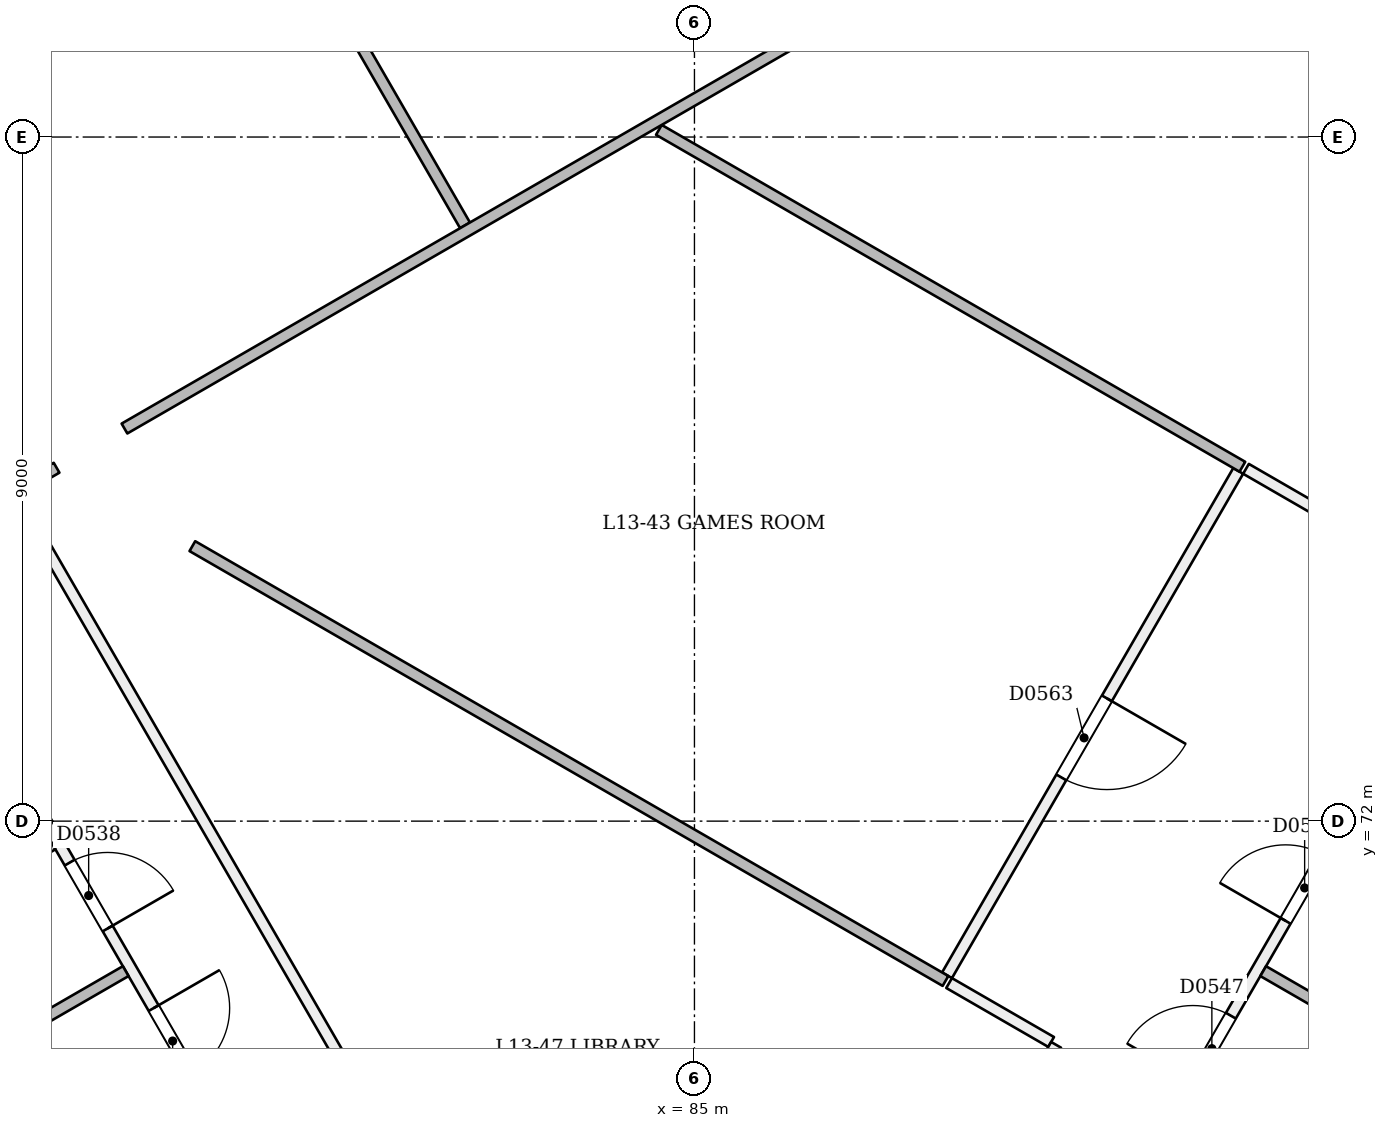
"""IFC4 building model, lengths in metres.
Left out: names, types, materials, properties, quantities, classifications, styles, units other than length and angle.
Written with IfcOpenShell. Run it as: python <this file> out.ifc"""

import sys

from ifc_helpers import new_model, si_unit, direction, frame, frame_2d, origin, place, context, subcontext, project, spatial, rectangle, extrude, element, fill, save


model = new_model("IFC4")
c1 = context("Model", 3, precision=1e-05, world=origin(), true_north=direction((0.0, 1.0)))
c2 = subcontext(c1, "Body", "Model", "MODEL_VIEW")
j1 = project(units=[si_unit("LENGTHUNIT", "METRE"), si_unit("PLANEANGLEUNIT", "RADIAN")], contexts=[c1])
p1 = place(None, origin())
s1 = spatial("IfcSite", under=j1, at=p1, CompositionType="ELEMENT")
p2 = place(p1, origin())
s2 = spatial("IfcBuilding", under=s1, at=p2, CompositionType="ELEMENT")
p3 = place(p2, frame((0.0, 0.0, 55.8)))
s3 = spatial("IfcBuildingStorey", under=s2, at=p3, CompositionType="ELEMENT", Elevation=55.8)
p4 = place(p3, frame((64.083, 93.447, 0.0), z_axis=(0.0, 0.0, 1.0), x_axis=(0.5000018851, -0.866024315419, 0.0)))
e1 = element("IfcWall", 1, at=p4, inside=s3, PredefinedType="PARTITIONING", context=c2, shape_type="SweptSolid", body=[
    extrude(rectangle(XDim=36.0, YDim=0.15, at=frame_2d((18.0, 0.0))), origin(), (0.0, 0.0, 1.0), 2.7),
])
p5 = place(p4, frame((0.605, 0.0, 0.0)))
e2 = element("IfcOpeningElement", 2, at=p5, cuts=e1, PredefinedType="OPENING", context=c2, shape_type="SweptSolid", body=[
    extrude(rectangle(XDim=1.0, YDim=2.1, at=frame_2d((0.5, 1.05))), frame((0.0, 0.085, 0.0), z_axis=(0.0, -1.0, 0.0), x_axis=(1.0, 0.0, 0.0)), (0.0, 0.0, 1.0), 0.171),
])
p6 = place(p4, frame((7.28, 0.0, 0.0)))
e3 = element("IfcOpeningElement", 3, at=p6, cuts=e1, PredefinedType="OPENING", context=c2, shape_type="SweptSolid", body=[
    extrude(rectangle(XDim=1.0, YDim=2.1, at=frame_2d((0.5, 1.05))), frame((0.0, 0.085, 0.0), z_axis=(0.0, -1.0, 0.0), x_axis=(1.0, 0.0, 0.0)), (0.0, 0.0, 1.0), 0.171),
])
p7 = place(p4, frame((9.72, 0.0, 0.0)))
e4 = element("IfcOpeningElement", 4, at=p7, cuts=e1, PredefinedType="OPENING", context=c2, shape_type="SweptSolid", body=[
    extrude(rectangle(XDim=1.0, YDim=2.1, at=frame_2d((0.5, 1.05))), frame((0.0, 0.085, 0.0), z_axis=(0.0, -1.0, 0.0), x_axis=(1.0, 0.0, 0.0)), (0.0, 0.0, 1.0), 0.171),
])
p8 = place(p4, frame((16.395, 0.0, 0.0)))
e5 = element("IfcOpeningElement", 5, at=p8, cuts=e1, PredefinedType="OPENING", context=c2, shape_type="SweptSolid", body=[
    extrude(rectangle(XDim=1.0, YDim=2.1, at=frame_2d((0.5, 1.05))), frame((0.0, 0.085, 0.0), z_axis=(0.0, -1.0, 0.0), x_axis=(1.0, 0.0, 0.0)), (0.0, 0.0, 1.0), 0.171),
])
p9 = place(p4, frame((18.72, 0.0, 0.0)))
e6 = element("IfcOpeningElement", 6, at=p9, cuts=e1, PredefinedType="OPENING", context=c2, shape_type="SweptSolid", body=[
    extrude(rectangle(XDim=1.0, YDim=2.1, at=frame_2d((0.5, 1.05))), frame((0.0, 0.085, 0.0), z_axis=(0.0, -1.0, 0.0), x_axis=(1.0, 0.0, 0.0)), (0.0, 0.0, 1.0), 0.171),
])
p10 = place(p4, frame((25.395, 0.0, 0.0)))
e7 = element("IfcOpeningElement", 7, at=p10, cuts=e1, PredefinedType="OPENING", context=c2, shape_type="SweptSolid", body=[
    extrude(rectangle(XDim=1.0, YDim=2.1, at=frame_2d((0.5, 1.05))), frame((0.0, 0.085, 0.0), z_axis=(0.0, -1.0, 0.0), x_axis=(1.0, 0.0, 0.0)), (0.0, 0.0, 1.0), 0.171),
])
p11 = place(p4, frame((27.605, 0.0, 0.0)))
e8 = element("IfcOpeningElement", 8, at=p11, cuts=e1, PredefinedType="OPENING", context=c2, shape_type="SweptSolid", body=[
    extrude(rectangle(XDim=1.0, YDim=2.1, at=frame_2d((0.5, 1.05))), frame((0.0, 0.085, 0.0), z_axis=(0.0, -1.0, 0.0), x_axis=(1.0, 0.0, 0.0)), (0.0, 0.0, 1.0), 0.171),
])
p12 = place(p4, frame((34.28, 0.0, 0.0)))
e9 = element("IfcOpeningElement", 9, at=p12, cuts=e1, PredefinedType="OPENING", context=c2, shape_type="SweptSolid", body=[
    extrude(rectangle(XDim=1.0, YDim=2.1, at=frame_2d((0.5, 1.05))), frame((0.0, 0.085, 0.0), z_axis=(0.0, -1.0, 0.0), x_axis=(1.0, 0.0, 0.0)), (0.0, 0.0, 1.0), 0.171),
])
p13 = place(p3, frame((85.99, 58.932, 0.0), z_axis=(0.0, 0.0, 1.0), x_axis=(0.500001547762, 0.866024510182, 0.0)))
e10 = element("IfcWall", 10, at=p13, inside=s3, PredefinedType="PARTITIONING", context=c2, shape_type="SweptSolid", body=[
    extrude(rectangle(XDim=42.454, YDim=0.15, at=frame_2d((21.227, 0.0))), origin(), (0.0, 0.0, 1.0), 2.7),
])
p14 = place(p13, frame((3.577, 0.0, 0.0)))
e11 = element("IfcOpeningElement", 11, at=p14, cuts=e10, PredefinedType="OPENING", context=c2, shape_type="SweptSolid", body=[
    extrude(rectangle(XDim=1.2, YDim=2.1, at=frame_2d((0.6, 1.05))), frame((0.0, 0.085, 0.0), z_axis=(0.0, -1.0, 0.0), x_axis=(1.0, 0.0, 0.0)), (0.0, 0.0, 1.0), 0.171),
])
p15 = place(p13, frame((11.134, 0.0, 0.0)))
e12 = element("IfcOpeningElement", 12, at=p15, cuts=e10, PredefinedType="OPENING", context=c2, shape_type="SweptSolid", body=[
    extrude(rectangle(XDim=1.0, YDim=2.1, at=frame_2d((0.5, 1.05))), frame((0.0, 0.085, 0.0), z_axis=(0.0, -1.0, 0.0), x_axis=(1.0, 0.0, 0.0)), (0.0, 0.0, 1.0), 0.171),
])
p16 = place(p13, frame((13.575, 0.0, 0.0)))
e13 = element("IfcOpeningElement", 13, at=p16, cuts=e10, PredefinedType="OPENING", context=c2, shape_type="SweptSolid", body=[
    extrude(rectangle(XDim=1.0, YDim=2.1, at=frame_2d((0.5, 1.05))), frame((0.0, 0.085, 0.0), z_axis=(0.0, -1.0, 0.0), x_axis=(1.0, 0.0, 0.0)), (0.0, 0.0, 1.0), 0.171),
])
p17 = place(p13, frame((20.134, 0.0, 0.0)))
e14 = element("IfcOpeningElement", 14, at=p17, cuts=e10, PredefinedType="OPENING", context=c2, shape_type="SweptSolid", body=[
    extrude(rectangle(XDim=1.0, YDim=2.1, at=frame_2d((0.5, 1.05))), frame((0.0, 0.085, 0.0), z_axis=(0.0, -1.0, 0.0), x_axis=(1.0, 0.0, 0.0)), (0.0, 0.0, 1.0), 0.171),
])
p18 = place(p13, frame((22.575, 0.0, 0.0)))
e15 = element("IfcOpeningElement", 15, at=p18, cuts=e10, PredefinedType="OPENING", context=c2, shape_type="SweptSolid", body=[
    extrude(rectangle(XDim=1.0, YDim=2.1, at=frame_2d((0.5, 1.05))), frame((0.0, 0.085, 0.0), z_axis=(0.0, -1.0, 0.0), x_axis=(1.0, 0.0, 0.0)), (0.0, 0.0, 1.0), 0.171),
])
p19 = place(p13, frame((29.134, 0.0, 0.0)))
e16 = element("IfcOpeningElement", 16, at=p19, cuts=e10, PredefinedType="OPENING", context=c2, shape_type="SweptSolid", body=[
    extrude(rectangle(XDim=1.0, YDim=2.1, at=frame_2d((0.5, 1.05))), frame((0.0, 0.085, 0.0), z_axis=(0.0, -1.0, 0.0), x_axis=(1.0, 0.0, 0.0)), (0.0, 0.0, 1.0), 0.171),
])
p20 = place(p13, frame((31.575, 0.0, 0.0)))
e17 = element("IfcOpeningElement", 17, at=p20, cuts=e10, PredefinedType="OPENING", context=c2, shape_type="SweptSolid", body=[
    extrude(rectangle(XDim=1.0, YDim=2.1, at=frame_2d((0.5, 1.05))), frame((0.0, 0.085, 0.0), z_axis=(0.0, -1.0, 0.0), x_axis=(1.0, 0.0, 0.0)), (0.0, 0.0, 1.0), 0.171),
])
p21 = place(p13, frame((38.134, 0.0, 0.0)))
e18 = element("IfcOpeningElement", 18, at=p21, cuts=e10, PredefinedType="OPENING", context=c2, shape_type="SweptSolid", body=[
    extrude(rectangle(XDim=1.0, YDim=2.1, at=frame_2d((0.5, 1.05))), frame((0.0, 0.085, 0.0), z_axis=(0.0, -1.0, 0.0), x_axis=(1.0, 0.0, 0.0)), (0.0, 0.0, 1.0), 0.171),
])
p22 = place(p13, frame((41.161, 0.0, 0.0)))
e19 = element("IfcOpeningElement", 19, at=p22, cuts=e10, PredefinedType="OPENING", context=c2, shape_type="SweptSolid", body=[
    extrude(rectangle(XDim=1.0, YDim=2.1, at=frame_2d((0.5, 1.05))), frame((0.0, 0.085, 0.0), z_axis=(0.0, -1.0, 0.0), x_axis=(1.0, 0.0, 0.0)), (0.0, 0.0, 1.0), 0.171),
])
p23 = place(p3, frame((92.154, 76.607, 0.0), z_axis=(0.0, 0.0, 1.0), x_axis=(-0.499984506476, -0.86603434879, 0.0)))
e20 = element("IfcWall", 20, at=p23, inside=s3, PredefinedType="PARTITIONING", context=c2, shape_type="SweptSolid", body=[
    extrude(rectangle(XDim=7.661, YDim=0.15, at=frame_2d((3.831, 0.0))), origin(), (0.0, 0.0, 1.0), 3.1),
])
p24 = place(p23, frame((3.455, 0.0, 0.0)))
e21 = element("IfcOpeningElement", 21, at=p24, cuts=e20, PredefinedType="OPENING", context=c2, shape_type="SweptSolid", body=[
    extrude(rectangle(XDim=1.2, YDim=2.1, at=frame_2d((0.6, 1.05))), frame((0.0, 0.085, 0.0), z_axis=(0.0, -1.0, 0.0), x_axis=(1.0, 0.0, 0.0)), (0.0, 0.0, 1.0), 0.171),
])
for number, where, z_axis, x_axis in (
    (22, (93.598, 75.86, 0.0), (0.0, 0.0, 1.0), (-0.866, 0.5, 0.0)),
    (23, (88.35, 69.87, 0.0), (0.0, 0.0, 1.0), (0.866, -0.5, 0.0)),
):
    element("IfcWall", number, at=place(p3, frame(where, z_axis=z_axis, x_axis=x_axis)), inside=s3, PredefinedType="PARTITIONING", context=c2, shape_type="SweptSolid", body=[
        extrude(rectangle(XDim=1.55, YDim=0.15, at=frame_2d((0.775, 0.0))), origin(), (0.0, 0.0, 1.0), 3.1),
    ])
p25 = place(p3, frame((89.758, 69.057, 0.0), z_axis=(0.0, 0.0, 1.0), x_axis=(-0.499985904184, -0.866033541855, 0.0)))
e24 = element("IfcWall", 24, at=p25, inside=s3, PredefinedType="PARTITIONING", context=c2, shape_type="SweptSolid", body=[
    extrude(rectangle(XDim=9.385, YDim=0.15, at=frame_2d((4.693, 0.0))), origin(), (0.0, 0.0, 1.0), 3.1),
])
p26 = place(p3, frame((85.0, 60.817, 0.0), z_axis=(0.0, 0.0, 1.0), x_axis=(-0.49999631887, 0.866027529076, 0.0)))
e25 = element("IfcWall", 25, at=p26, inside=s3, PredefinedType="PARTITIONING", context=c2, shape_type="SweptSolid", body=[
    extrude(rectangle(XDim=34.391, YDim=0.15, at=frame_2d((17.195, 0.0))), origin(), (0.0, 0.0, 1.0), 3.1),
])
p27 = place(p26, frame((24.599, 0.0, 0.0)))
e26 = element("IfcOpeningElement", 26, at=p27, cuts=e25, PredefinedType="OPENING", context=c2, shape_type="SweptSolid", body=[
    extrude(rectangle(XDim=1.2, YDim=2.1, at=frame_2d((0.6, 1.05))), frame((0.0, 0.085, 0.0), z_axis=(0.0, -1.0, 0.0), x_axis=(1.0, 0.0, 0.0)), (0.0, 0.0, 1.0), 0.171),
])
p28 = place(p26, frame((7.281, 0.0, 0.0)))
e27 = element("IfcOpeningElement", 27, at=p28, cuts=e25, PredefinedType="OPENING", context=c2, shape_type="SweptSolid", body=[
    extrude(rectangle(XDim=1.2, YDim=2.1, at=frame_2d((0.6, 1.05))), frame((0.0, 0.085, 0.0), z_axis=(0.0, -1.0, 0.0), x_axis=(1.0, 0.0, 0.0)), (0.0, 0.0, 1.0), 0.171),
])
p29 = place(p3, frame((76.568, 71.672, 0.0), z_axis=(0.0, 0.0, 1.0), x_axis=(-0.86601045545, -0.500025890382, 0.0)))
e28 = element("IfcWall", 28, at=p29, inside=s3, PredefinedType="PARTITIONING", context=c2, shape_type="SweptSolid", body=[
    extrude(rectangle(XDim=2.925, YDim=0.1, at=frame_2d((1.462, 0.0))), origin(), (0.0, 0.0, 1.0), 3.1),
])
p30 = place(p29, frame((0.975, 0.0, 0.0)))
e29 = element("IfcOpeningElement", 29, at=p30, cuts=e28, PredefinedType="OPENING", context=c2, shape_type="SweptSolid", body=[
    extrude(rectangle(XDim=0.9, YDim=2.1, at=frame_2d((0.45, 1.05))), frame((0.0, 0.061, 0.0), z_axis=(0.0, -1.0, 0.0), x_axis=(1.0, 0.0, 0.0)), (0.0, 0.0, 1.0), 0.121),
])
for number, where, z_axis, x_axis in (
    (30, (72.022, 66.854, 0.0), (0.0, 0.0, 1.0), (0.866, 0.5, 0.0)),
    (31, (97.978, 66.854, 0.0), (0.0, 0.0, 1.0), (-0.866, 0.5, 0.0)),
):
    element("IfcWall", number, at=place(p3, frame(where, z_axis=z_axis, x_axis=x_axis)), inside=s3, PredefinedType="PARTITIONING", context=c2, shape_type="SweptSolid", body=[
        extrude(rectangle(XDim=6.345, YDim=0.15, at=frame_2d((3.173, 0.0))), origin(), (0.0, 0.0, 1.0), 2.6),
    ])
p31 = place(p3, frame((92.208, 76.662, 0.0), z_axis=(0.0, 0.0, 1.0), x_axis=(-0.8660209256, 0.500007756363, 0.0)))
e32 = element("IfcWall", 32, at=p31, inside=s3, PredefinedType="PARTITIONING", context=c2, shape_type="SweptSolid", body=[
    extrude(rectangle(XDim=8.864, YDim=0.15, at=frame_2d((4.432, 0.0))), origin(), (0.0, 0.0, 1.0), 3.1),
])
p32 = place(p3, frame((78.395, 75.618, 0.0), z_axis=(0.0, 0.0, 1.0), x_axis=(0.866027097721, -0.499997066004, 0.0)))
e33 = element("IfcWall", 33, at=p32, inside=s3, PredefinedType="PARTITIONING", context=c2, shape_type="SweptSolid", body=[
    extrude(rectangle(XDim=11.441, YDim=0.15, at=frame_2d((5.72, 0.0))), origin(), (0.0, 0.0, 1.0), 3.1),
])
p33 = place(p3, frame((76.111, 76.363, 0.0), z_axis=(0.0, 0.0, 1.0), x_axis=(0.866192672213, 0.499710170603, 0.0)))
e34 = element("IfcWall", 34, at=p33, inside=s3, PredefinedType="PARTITIONING", context=c2, shape_type="SweptSolid", body=[
    extrude(rectangle(XDim=0.573, YDim=0.15, at=frame_2d((0.287, 0.0))), origin(), (0.0, 0.0, 1.0), 3.1),
])
p34 = place(p3, frame((81.982, 79.838, 0.0), z_axis=(0.0, 0.0, 1.0), x_axis=(-0.500008318019, 0.866020601321, 0.0)))
e35 = element("IfcWall", 35, at=p34, inside=s3, PredefinedType="PARTITIONING", context=c2, shape_type="SweptSolid", body=[
    extrude(rectangle(XDim=12.297, YDim=0.15, at=frame_2d((6.148, 0.0))), origin(), (0.0, 0.0, 1.0), 3.1),
])
p35 = place(p3, frame((100.529, 90.46, 0.0), z_axis=(0.0, 0.0, 1.0), x_axis=(-0.866026416576, -0.499998245789, 0.0)))
e36 = element("IfcWall", 36, at=p35, inside=s3, PredefinedType="PARTITIONING", context=c2, shape_type="SweptSolid", body=[
    extrude(rectangle(XDim=26.59, YDim=0.15, at=frame_2d((13.295, 0.0))), origin(), (0.0, 0.0, 1.0), 3.1),
])
p36 = place(p10, origin())
e37 = element("IfcDoor", 37, at=p36, inside=s3, OperationType="SINGLE_SWING_RIGHT", PredefinedType="NOTDEFINED", context=c2, shape_type="SweptSolid", body=[
    extrude(rectangle(XDim=1.0, YDim=2.1, at=frame_2d((0.5, 1.05))), frame((0.0, 0.025, 0.0), z_axis=(0.0, -1.0, 0.0), x_axis=(1.0, 0.0, 0.0)), (0.0, 0.0, 1.0), 0.05),
])
fill(e7, e37)
p37 = place(p11, origin())
e38 = element("IfcDoor", 38, at=p37, inside=s3, OperationType="SINGLE_SWING_LEFT", PredefinedType="NOTDEFINED", context=c2, shape_type="SweptSolid", body=[
    extrude(rectangle(XDim=1.0, YDim=2.1, at=frame_2d((0.5, 1.05))), frame((0.0, 0.025, 0.0), z_axis=(0.0, -1.0, 0.0), x_axis=(1.0, 0.0, 0.0)), (0.0, 0.0, 1.0), 0.05),
])
fill(e8, e38)
p38 = place(p15, origin())
e39 = element("IfcDoor", 39, at=p38, inside=s3, OperationType="SINGLE_SWING_LEFT", PredefinedType="NOTDEFINED", context=c2, shape_type="SweptSolid", body=[
    extrude(rectangle(XDim=1.0, YDim=2.1, at=frame_2d((0.5, 1.05))), frame((0.0, 0.025, 0.0), z_axis=(0.0, -1.0, 0.0), x_axis=(1.0, 0.0, 0.0)), (0.0, 0.0, 1.0), 0.05),
])
fill(e12, e39)
p39 = place(p16, origin())
e40 = element("IfcDoor", 40, at=p39, inside=s3, OperationType="SINGLE_SWING_LEFT", PredefinedType="NOTDEFINED", context=c2, shape_type="SweptSolid", body=[
    extrude(rectangle(XDim=1.0, YDim=2.1, at=frame_2d((0.5, 1.05))), frame((0.0, 0.025, 0.0), z_axis=(0.0, -1.0, 0.0), x_axis=(1.0, 0.0, 0.0)), (0.0, 0.0, 1.0), 0.05),
])
fill(e13, e40)
p40 = place(p24, origin())
e41 = element("IfcDoor", 41, at=p40, inside=s3, OperationType="SINGLE_SWING_LEFT", PredefinedType="NOTDEFINED", context=c2, shape_type="SweptSolid", body=[
    extrude(rectangle(XDim=1.2, YDim=2.1, at=frame_2d((0.6, 1.05))), frame((0.0, 0.025, 0.0), z_axis=(0.0, -1.0, 0.0), x_axis=(1.0, 0.0, 0.0)), (0.0, 0.0, 1.0), 0.05),
])
fill(e21, e41)
save(model, sys.argv[1])
